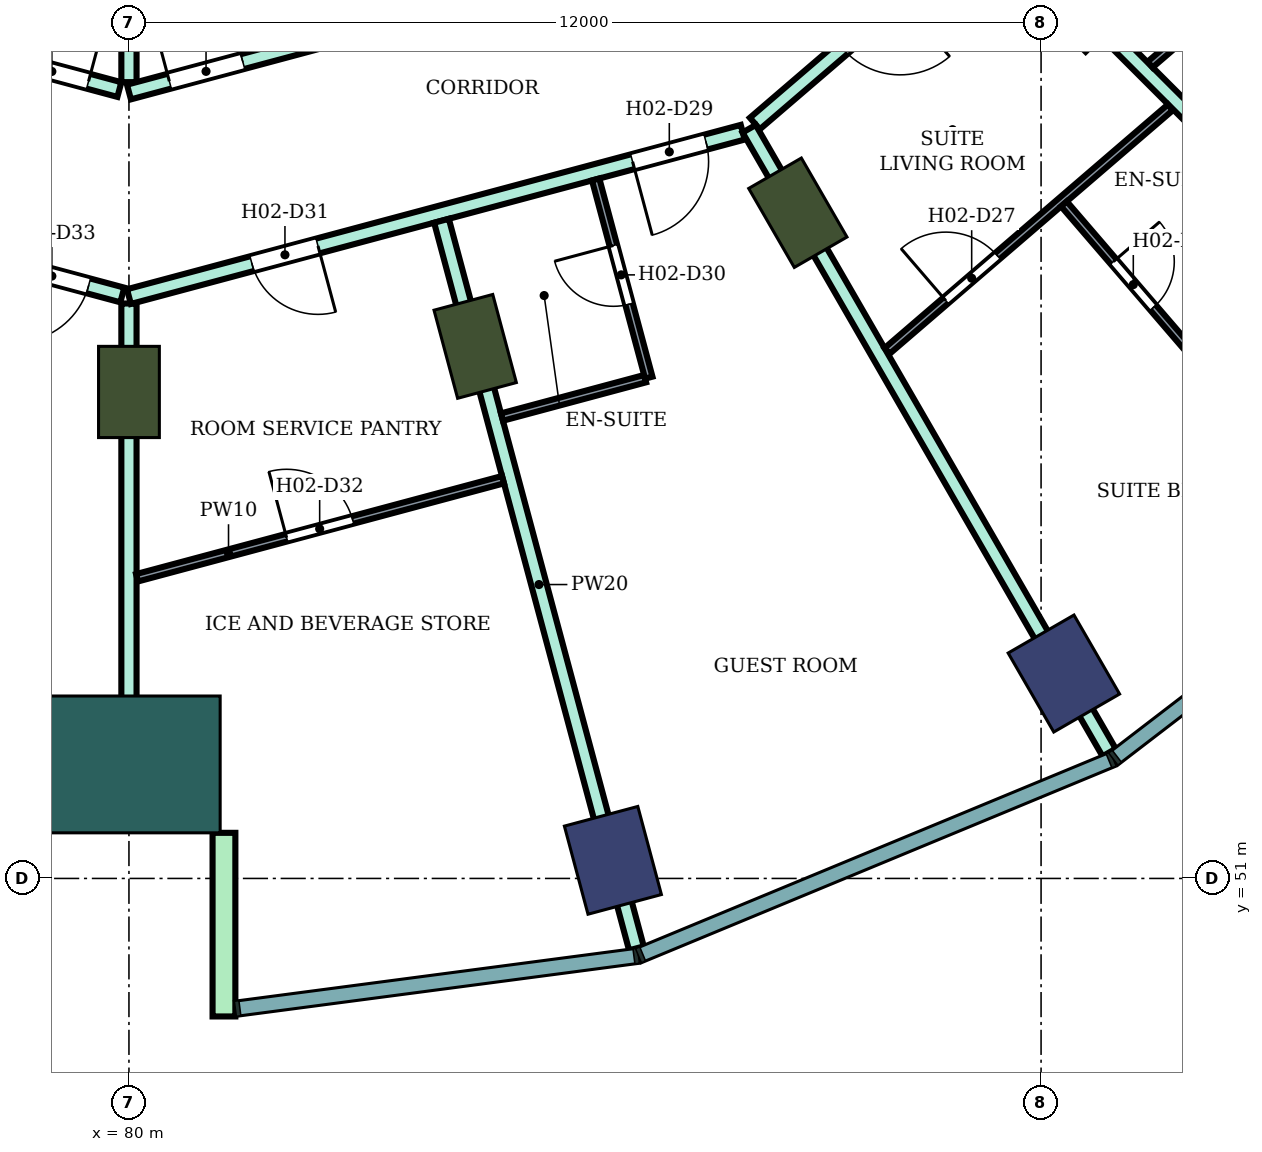
"""IFC4 building model, lengths in metres.
Left out: names, types, materials, properties, quantities, classifications, styles, units other than length and angle.
Written with IfcOpenShell. Run it as: python <this file> out.ifc"""

import sys

from ifc_helpers import new_model, si_unit, direction, frame, frame_2d, origin, origin_2d, place, context, subcontext, project, spatial, rectangle, extrude, element, fill, save


model = new_model("IFC4")
c1 = context("Model", 3, precision=1e-05, world=origin(), true_north=direction((0.0, 1.0)))
c2 = subcontext(c1, "Body", "Model", "MODEL_VIEW")
j1 = project(units=[si_unit("LENGTHUNIT", "METRE"), si_unit("PLANEANGLEUNIT", "RADIAN")], contexts=[c1])
p1 = place(None, origin())
s1 = spatial("IfcSite", under=j1, at=p1, CompositionType="ELEMENT")
p2 = place(p1, origin())
s2 = spatial("IfcBuilding", under=s1, at=p2, CompositionType="ELEMENT")
p3 = place(p2, frame((0.0, 0.0, 47.8)))
s3 = spatial("IfcBuildingStorey", under=s2, at=p3, CompositionType="ELEMENT", Elevation=47.8)
for number, where, z_axis, x_axis in (
    (1, (86.367, 51.238, 0.0), (0.0, 0.0, 1.0), (0.259, -0.966, 0.0)),
    (2, (92.3, 53.696, 0.0), (0.0, 0.0, 1.0), (0.5, -0.866, 0.0)),
):
    element("IfcColumn", number, at=place(p3, frame(where, z_axis=z_axis, x_axis=x_axis)), inside=s3, PredefinedType="COLUMN", context=c2, shape_type="SweptSolid", body=[
        extrude(rectangle(XDim=1.2, YDim=1.0, at=origin_2d()), origin(), (0.0, 0.0, 1.0), 3.8),
    ])
for number, where, z_axis, x_axis in (
    (3, (80.0, 57.4, 0.0), (0.0, 0.0, 1.0), (0.0, -1.0, 0.0)),
    (4, (84.555, 58.0, 0.0), (0.0, 0.0, 1.0), (0.259, -0.966, 0.0)),
    (5, (88.8, 59.758, 0.0), (0.0, 0.0, 1.0), (0.5, -0.866, 0.0)),
    (6, (92.445, 62.555, 0.0), (0.0, 0.0, 1.0), (0.707, -0.707, 0.0)),
):
    element("IfcColumn", number, at=place(p3, frame(where, z_axis=z_axis, x_axis=x_axis)), inside=s3, PredefinedType="COLUMN", context=c2, shape_type="SweptSolid", body=[
        extrude(rectangle(XDim=1.2, YDim=0.8, at=origin_2d()), origin(), (0.0, 0.0, 1.0), 3.8),
    ])
p4 = place(p3, frame((80.0, 52.5, 0.0), z_axis=(0.0, 0.0, 1.0), x_axis=(0.0, -1.0, 0.0)))
e7 = element("IfcColumn", 7, at=p4, inside=s3, PredefinedType="COLUMN", context=c2, shape_type="SweptSolid", body=[
    extrude(rectangle(XDim=1.8, YDim=2.4, at=origin_2d()), origin(), (0.0, 0.0, 1.0), 3.8),
])
p5 = place(p3, frame((81.25, 51.6, 0.0), z_axis=(0.0, 0.0, 1.0), x_axis=(0.0, -1.0, 0.0)))
e8 = element("IfcWall", 8, at=p5, inside=s3, PredefinedType="NOTDEFINED", context=c2, shape_type="SweptSolid", body=[
    extrude(rectangle(XDim=2.416, YDim=0.3, at=frame_2d((1.208, 0.0))), origin(), (0.0, 0.0, 1.0), 3.8),
])
p6 = place(p3, frame((71.877, 60.832, 0.0), z_axis=(0.0, 0.0, 1.0), x_axis=(0.965852509869, -0.259092510851, 0.0)))
e9 = element("IfcWall", 9, at=p6, inside=s3, PredefinedType="PARTITIONING", context=c2, shape_type="SweptSolid", body=[
    extrude(rectangle(XDim=8.32, YDim=0.2, at=frame_2d((4.16, 0.0))), origin(), (0.0, 0.0, 1.0), 3.35),
])
p7 = place(p6, frame((6.86, 0.0, 0.0)))
e10 = element("IfcOpeningElement", 10, at=p7, cuts=e9, PredefinedType="OPENING", context=c2, shape_type="SweptSolid", body=[
    extrude(rectangle(XDim=1.0, YDim=2.1, at=frame_2d((0.5, 1.05))), frame((0.0, 0.11, 0.0), z_axis=(0.0, -1.0, 0.0), x_axis=(1.0, 0.0, 0.0)), (0.0, 0.0, 1.0), 0.22),
])
p8 = place(p6, frame((0.55, 0.0, 0.0)))
e11 = element("IfcOpeningElement", 11, at=p8, cuts=e9, PredefinedType="OPENING", context=c2, shape_type="SweptSolid", body=[
    extrude(rectangle(XDim=1.0, YDim=2.1, at=frame_2d((0.5, 1.05))), frame((0.0, 0.11, 0.0), z_axis=(0.0, -1.0, 0.0), x_axis=(1.0, 0.0, 0.0)), (0.0, 0.0, 1.0), 0.22),
])
p9 = place(p3, frame((73.287, 63.145, 0.0), z_axis=(0.0, 0.0, 1.0), x_axis=(0.965854200194, -0.259086209526, 0.0)))
e12 = element("IfcWall", 12, at=p9, inside=s3, PredefinedType="PARTITIONING", context=c2, shape_type="SweptSolid", body=[
    extrude(rectangle(XDim=6.82, YDim=0.2, at=frame_2d((3.41, 0.0))), origin(), (0.0, 0.0, 1.0), 3.35),
])
p10 = place(p9, frame((5.4, 0.0, 0.0)))
e13 = element("IfcOpeningElement", 13, at=p10, cuts=e12, PredefinedType="OPENING", context=c2, shape_type="SweptSolid", body=[
    extrude(rectangle(XDim=1.0, YDim=2.1, at=frame_2d((0.5, 1.05))), frame((0.0, 0.11, 0.0), z_axis=(0.0, -1.0, 0.0), x_axis=(1.0, 0.0, 0.0)), (0.0, 0.0, 1.0), 0.22),
])
p11 = place(p3, frame((80.0, 51.8, 0.0), z_axis=(0.0, 0.0, 1.0), x_axis=(0.0, 1.0, 0.0)))
e14 = element("IfcWall", 14, at=p11, inside=s3, PredefinedType="PARTITIONING", context=c2, shape_type="SweptSolid", body=[
    extrude(rectangle(XDim=6.764, YDim=0.2, at=frame_2d((3.382, 0.0))), origin(), (0.0, 0.0, 1.0), 3.35),
])
p12 = place(p3, frame((80.0, 58.655, 0.0), z_axis=(0.0, 0.0, 1.0), x_axis=(0.965967338894, 0.258664068224, 0.0)))
e15 = element("IfcWall", 15, at=p12, inside=s3, PredefinedType="PARTITIONING", context=c2, shape_type="SweptSolid", body=[
    extrude(rectangle(XDim=8.36, YDim=0.2, at=frame_2d((4.18, 0.0))), origin(), (0.0, 0.0, 1.0), 3.35),
])
p13 = place(p12, frame((6.86, 0.0, 0.0)))
e16 = element("IfcOpeningElement", 16, at=p13, cuts=e15, PredefinedType="OPENING", context=c2, shape_type="SweptSolid", body=[
    extrude(rectangle(XDim=1.0, YDim=2.1, at=frame_2d((0.5, 1.05))), frame((0.0, 0.11, 0.0), z_axis=(0.0, -1.0, 0.0), x_axis=(1.0, 0.0, 0.0)), (0.0, 0.0, 1.0), 0.22),
])
p14 = place(p12, frame((1.675, 0.0, 0.0)))
e17 = element("IfcOpeningElement", 17, at=p14, cuts=e15, PredefinedType="OPENING", context=c2, shape_type="SweptSolid", body=[
    extrude(rectangle(XDim=0.9, YDim=2.1, at=frame_2d((0.45, 1.05))), frame((0.0, 0.11, 0.0), z_axis=(0.0, -1.0, 0.0), x_axis=(1.0, 0.0, 0.0)), (0.0, 0.0, 1.0), 0.22),
])
p15 = place(p3, frame((80.0, 61.476, 0.0), z_axis=(0.0, 0.0, 1.0), x_axis=(0.0, 1.0, 0.0)))
e18 = element("IfcWall", 18, at=p15, inside=s3, PredefinedType="PARTITIONING", context=c2, shape_type="SweptSolid", body=[
    extrude(rectangle(XDim=5.825, YDim=0.2, at=frame_2d((2.913, 0.0))), origin(), (0.0, 0.0, 1.0), 3.35),
])
p16 = place(p3, frame((80.0, 61.346, 0.0), z_axis=(0.0, 0.0, 1.0), x_axis=(0.965924181808, 0.258825182312, 0.0)))
e19 = element("IfcWall", 19, at=p16, inside=s3, PredefinedType="PARTITIONING", context=c2, shape_type="SweptSolid", body=[
    extrude(rectangle(XDim=6.94, YDim=0.2, at=frame_2d((3.47, 0.0))), origin(), (0.0, 0.0, 1.0), 3.35),
])
p17 = place(p16, frame((0.55, 0.0, 0.0)))
e20 = element("IfcOpeningElement", 20, at=p17, cuts=e19, PredefinedType="OPENING", context=c2, shape_type="SweptSolid", body=[
    extrude(rectangle(XDim=1.0, YDim=2.1, at=frame_2d((0.5, 1.05))), frame((0.0, 0.11, 0.0), z_axis=(0.0, -1.0, 0.0), x_axis=(1.0, 0.0, 0.0)), (0.0, 0.0, 1.0), 0.22),
])
p18 = place(p3, frame((84.112, 59.652, 0.0), z_axis=(0.0, 0.0, 1.0), x_axis=(0.258791091927, -0.965933315886, 0.0)))
e21 = element("IfcWall", 21, at=p18, inside=s3, PredefinedType="PARTITIONING", context=c2, shape_type="SweptSolid", body=[
    extrude(rectangle(XDim=9.909, YDim=0.2, at=frame_2d((4.955, 0.0))), origin(), (0.0, 0.0, 1.0), 3.35),
])
p19 = place(p3, frame((88.235, 60.931, 0.0), z_axis=(0.0, 0.0, 1.0), x_axis=(0.758799498714, 0.651324282329, 0.0)))
e22 = element("IfcWall", 22, at=p19, inside=s3, PredefinedType="PARTITIONING", context=c2, shape_type="SweptSolid", body=[
    extrude(rectangle(XDim=6.186, YDim=0.2, at=frame_2d((3.093, 0.0))), origin(), (0.0, 0.0, 1.0), 3.35),
])
p20 = place(p19, frame((1.519, 0.0, 0.0)))
e23 = element("IfcOpeningElement", 23, at=p20, cuts=e22, PredefinedType="OPENING", context=c2, shape_type="SweptSolid", body=[
    extrude(rectangle(XDim=1.0, YDim=2.1, at=frame_2d((0.5, 1.05))), frame((0.0, 0.11, 0.0), z_axis=(0.0, -1.0, 0.0), x_axis=(1.0, 0.0, 0.0)), (0.0, 0.0, 1.0), 0.22),
])
p21 = place(p3, frame((88.159, 60.863, 0.0), z_axis=(0.0, 0.0, 1.0), x_axis=(0.499897184548, -0.866084756177, 0.0)))
e24 = element("IfcWall", 24, at=p21, inside=s3, PredefinedType="PARTITIONING", context=c2, shape_type="SweptSolid", body=[
    extrude(rectangle(XDim=9.475, YDim=0.2, at=frame_2d((4.737, 0.0))), origin(), (0.0, 0.0, 1.0), 3.35),
])
p22 = place(p3, frame((91.449, 63.548, 0.0), z_axis=(0.0, 0.0, 1.0), x_axis=(0.706984810649, -0.707228730688, 0.0)))
e25 = element("IfcWall", 25, at=p22, inside=s3, PredefinedType="PARTITIONING", context=c2, shape_type="SweptSolid", body=[
    extrude(rectangle(XDim=7.006, YDim=0.2, at=frame_2d((3.503, 0.0))), origin(), (0.0, 0.0, 1.0), 3.35),
])
p23 = place(p3, frame((80.106, 54.956, 0.0), z_axis=(0.0, 0.0, 1.0), x_axis=(0.965910666284, 0.258875616386, 0.0)))
e26 = element("IfcWall", 26, at=p23, inside=s3, PredefinedType="PARTITIONING", context=c2, shape_type="SweptSolid", body=[
    extrude(rectangle(XDim=4.985, YDim=0.1, at=frame_2d((2.493, 0.0))), origin(), (0.0, 0.0, 1.0), 3.35),
])
p24 = place(p23, frame((2.038, 0.0, 0.0)))
e27 = element("IfcOpeningElement", 27, at=p24, cuts=e26, PredefinedType="OPENING", context=c2, shape_type="SweptSolid", body=[
    extrude(rectangle(XDim=0.9, YDim=2.1, at=frame_2d((0.45, 1.05))), frame((0.0, 0.06, 0.0), z_axis=(0.0, -1.0, 0.0), x_axis=(1.0, 0.0, 0.0)), (0.0, 0.0, 1.0), 0.12),
])
p25 = place(p3, frame((84.908, 57.07, 0.0), z_axis=(0.0, 0.0, 1.0), x_axis=(0.965853538138, 0.25908867761, 0.0)))
e28 = element("IfcWall", 28, at=p25, inside=s3, PredefinedType="PARTITIONING", context=c2, shape_type="SweptSolid", body=[
    extrude(rectangle(XDim=1.95, YDim=0.1, at=frame_2d((0.975, 0.0))), origin(), (0.0, 0.0, 1.0), 3.35),
])
p26 = place(p3, frame((86.14, 60.196, 0.0), z_axis=(0.0, 0.0, 1.0), x_axis=(0.258945475746, -0.965891940432, 0.0)))
e29 = element("IfcWall", 29, at=p26, inside=s3, PredefinedType="PARTITIONING", context=c2, shape_type="SweptSolid", body=[
    extrude(rectangle(XDim=2.7, YDim=0.1, at=frame_2d((1.35, 0.0))), origin(), (0.0, 0.0, 1.0), 3.35),
])
p27 = place(p26, frame((0.9, 0.0, 0.0)))
e30 = element("IfcOpeningElement", 30, at=p27, cuts=e29, PredefinedType="OPENING", context=c2, shape_type="SweptSolid", body=[
    extrude(rectangle(XDim=0.8, YDim=2.1, at=frame_2d((0.4, 1.05))), frame((0.0, 0.06, 0.0), z_axis=(0.0, -1.0, 0.0), x_axis=(1.0, 0.0, 0.0)), (0.0, 0.0, 1.0), 0.12),
])
p28 = place(p3, frame((89.974, 57.94, 0.0), z_axis=(0.0, 0.0, 1.0), x_axis=(0.75821417454, 0.652005571699, 0.0)))
e31 = element("IfcWall", 31, at=p28, inside=s3, PredefinedType="PARTITIONING", context=c2, shape_type="SweptSolid", body=[
    extrude(rectangle(XDim=4.915, YDim=0.1, at=frame_2d((2.457, 0.0))), origin(), (0.0, 0.0, 1.0), 3.35),
])
p29 = place(p28, frame((1.017, 0.0, 0.0)))
e32 = element("IfcOpeningElement", 32, at=p29, cuts=e31, PredefinedType="OPENING", context=c2, shape_type="SweptSolid", body=[
    extrude(rectangle(XDim=0.9, YDim=2.1, at=frame_2d((0.45, 1.05))), frame((0.0, 0.06, 0.0), z_axis=(0.0, -1.0, 0.0), x_axis=(1.0, 0.0, 0.0)), (0.0, 0.0, 1.0), 0.12),
])
p30 = place(p3, frame((92.301, 59.874, 0.0), z_axis=(0.0, 0.0, 1.0), x_axis=(0.652061320562, -0.758166231262, 0.0)))
e33 = element("IfcWall", 33, at=p30, inside=s3, PredefinedType="PARTITIONING", context=c2, shape_type="SweptSolid", body=[
    extrude(rectangle(XDim=2.8, YDim=0.1, at=frame_2d((1.4, 0.0))), origin(), (0.0, 0.0, 1.0), 3.35),
])
p31 = place(p30, frame((1.0, 0.0, 0.0)))
e34 = element("IfcOpeningElement", 34, at=p31, cuts=e33, PredefinedType="OPENING", context=c2, shape_type="SweptSolid", body=[
    extrude(rectangle(XDim=0.8, YDim=2.1, at=frame_2d((0.4, 1.05))), frame((0.0, 0.06, 0.0), z_axis=(0.0, -1.0, 0.0), x_axis=(1.0, 0.0, 0.0)), (0.0, 0.0, 1.0), 0.12),
])
p32 = place(p3, frame((93.435, 61.707, 0.0), z_axis=(0.0, 0.0, 1.0), x_axis=(0.758070495124, 0.652172618578, 0.0)))
e35 = element("IfcWall", 35, at=p32, inside=s3, PredefinedType="PARTITIONING", context=c2, shape_type="SweptSolid", body=[
    extrude(rectangle(XDim=1.789, YDim=0.1, at=frame_2d((0.895, 0.0))), origin(), (0.0, 0.0, 1.0), 3.35),
])
p33 = place(p29, origin())
e36 = element("IfcDoor", 36, at=p33, inside=s3, OperationType="SINGLE_SWING_LEFT", PredefinedType="DOOR", context=c2, shape_type="SweptSolid", body=[
    extrude(rectangle(XDim=0.9, YDim=2.1, at=frame_2d((0.45, 1.05))), frame((0.0, 0.025, 0.0), z_axis=(0.0, -1.0, 0.0), x_axis=(1.0, 0.0, 0.0)), (0.0, 0.0, 1.0), 0.05),
])
fill(e32, e36)
p34 = place(p31, origin())
e37 = element("IfcDoor", 37, at=p34, inside=s3, OperationType="SINGLE_SWING_LEFT", PredefinedType="DOOR", context=c2, shape_type="SweptSolid", body=[
    extrude(rectangle(XDim=0.8, YDim=2.1, at=frame_2d((0.4, 1.05))), frame((0.0, 0.025, 0.0), z_axis=(0.0, -1.0, 0.0), x_axis=(1.0, 0.0, 0.0)), (0.0, 0.0, 1.0), 0.05),
])
fill(e34, e37)
p35 = place(p13, frame((1.0, 0.0, 0.0), z_axis=(0.0, 0.0, 1.0), x_axis=(-1.0, 0.0, 0.0)))
e38 = element("IfcDoor", 38, at=p35, inside=s3, OperationType="SINGLE_SWING_RIGHT", PredefinedType="DOOR", context=c2, shape_type="SweptSolid", body=[
    extrude(rectangle(XDim=1.0, YDim=2.1, at=frame_2d((0.5, 1.05))), frame((0.0, 0.025, 0.0), z_axis=(0.0, -1.0, 0.0), x_axis=(1.0, 0.0, 0.0)), (0.0, 0.0, 1.0), 0.05),
])
fill(e16, e38)
p36 = place(p27, frame((0.8, 0.0, 0.0), z_axis=(0.0, 0.0, 1.0), x_axis=(-1.0, 0.0, 0.0)))
e39 = element("IfcDoor", 39, at=p36, inside=s3, OperationType="SINGLE_SWING_RIGHT", PredefinedType="DOOR", context=c2, shape_type="SweptSolid", body=[
    extrude(rectangle(XDim=0.8, YDim=2.1, at=frame_2d((0.4, 1.05))), frame((0.0, 0.025, 0.0), z_axis=(0.0, -1.0, 0.0), x_axis=(1.0, 0.0, 0.0)), (0.0, 0.0, 1.0), 0.05),
])
fill(e30, e39)
p37 = place(p14, frame((0.9, 0.0, 0.0), z_axis=(0.0, 0.0, 1.0), x_axis=(-1.0, 0.0, 0.0)))
e40 = element("IfcDoor", 40, at=p37, inside=s3, OperationType="SINGLE_SWING_LEFT", PredefinedType="DOOR", context=c2, shape_type="SweptSolid", body=[
    extrude(rectangle(XDim=0.9, YDim=2.1, at=frame_2d((0.45, 1.05))), frame((0.0, 0.025, 0.0), z_axis=(0.0, -1.0, 0.0), x_axis=(1.0, 0.0, 0.0)), (0.0, 0.0, 1.0), 0.05),
])
fill(e17, e40)
p38 = place(p24, origin())
e41 = element("IfcDoor", 41, at=p38, inside=s3, OperationType="SINGLE_SWING_LEFT", PredefinedType="DOOR", context=c2, shape_type="SweptSolid", body=[
    extrude(rectangle(XDim=0.9, YDim=2.1, at=frame_2d((0.45, 1.05))), frame((0.0, 0.025, 0.0), z_axis=(0.0, -1.0, 0.0), x_axis=(1.0, 0.0, 0.0)), (0.0, 0.0, 1.0), 0.05),
])
fill(e27, e41)
p39 = place(p7, frame((1.0, 0.0, 0.0), z_axis=(0.0, 0.0, 1.0), x_axis=(-1.0, 0.0, 0.0)))
e42 = element("IfcDoor", 42, at=p39, inside=s3, OperationType="SINGLE_SWING_RIGHT", PredefinedType="DOOR", context=c2, shape_type="SweptSolid", body=[
    extrude(rectangle(XDim=1.0, YDim=2.1, at=frame_2d((0.5, 1.05))), frame((0.0, 0.025, 0.0), z_axis=(0.0, -1.0, 0.0), x_axis=(1.0, 0.0, 0.0)), (0.0, 0.0, 1.0), 0.05),
])
fill(e10, e42)
p40 = place(p17, origin())
e43 = element("IfcDoor", 43, at=p40, inside=s3, OperationType="SINGLE_SWING_LEFT", PredefinedType="DOOR", context=c2, shape_type="SweptSolid", body=[
    extrude(rectangle(XDim=1.0, YDim=2.1, at=frame_2d((0.5, 1.05))), frame((0.0, 0.025, 0.0), z_axis=(0.0, -1.0, 0.0), x_axis=(1.0, 0.0, 0.0)), (0.0, 0.0, 1.0), 0.05),
])
fill(e20, e43)
p41 = place(p10, origin())
e44 = element("IfcDoor", 44, at=p41, inside=s3, OperationType="SINGLE_SWING_RIGHT", PredefinedType="DOOR", context=c2, shape_type="SweptSolid", body=[
    extrude(rectangle(XDim=1.0, YDim=2.1, at=frame_2d((0.5, 1.05))), frame((0.0, 0.025, 0.0), z_axis=(0.0, -1.0, 0.0), x_axis=(1.0, 0.0, 0.0)), (0.0, 0.0, 1.0), 0.05),
])
fill(e13, e44)
save(model, sys.argv[1])
